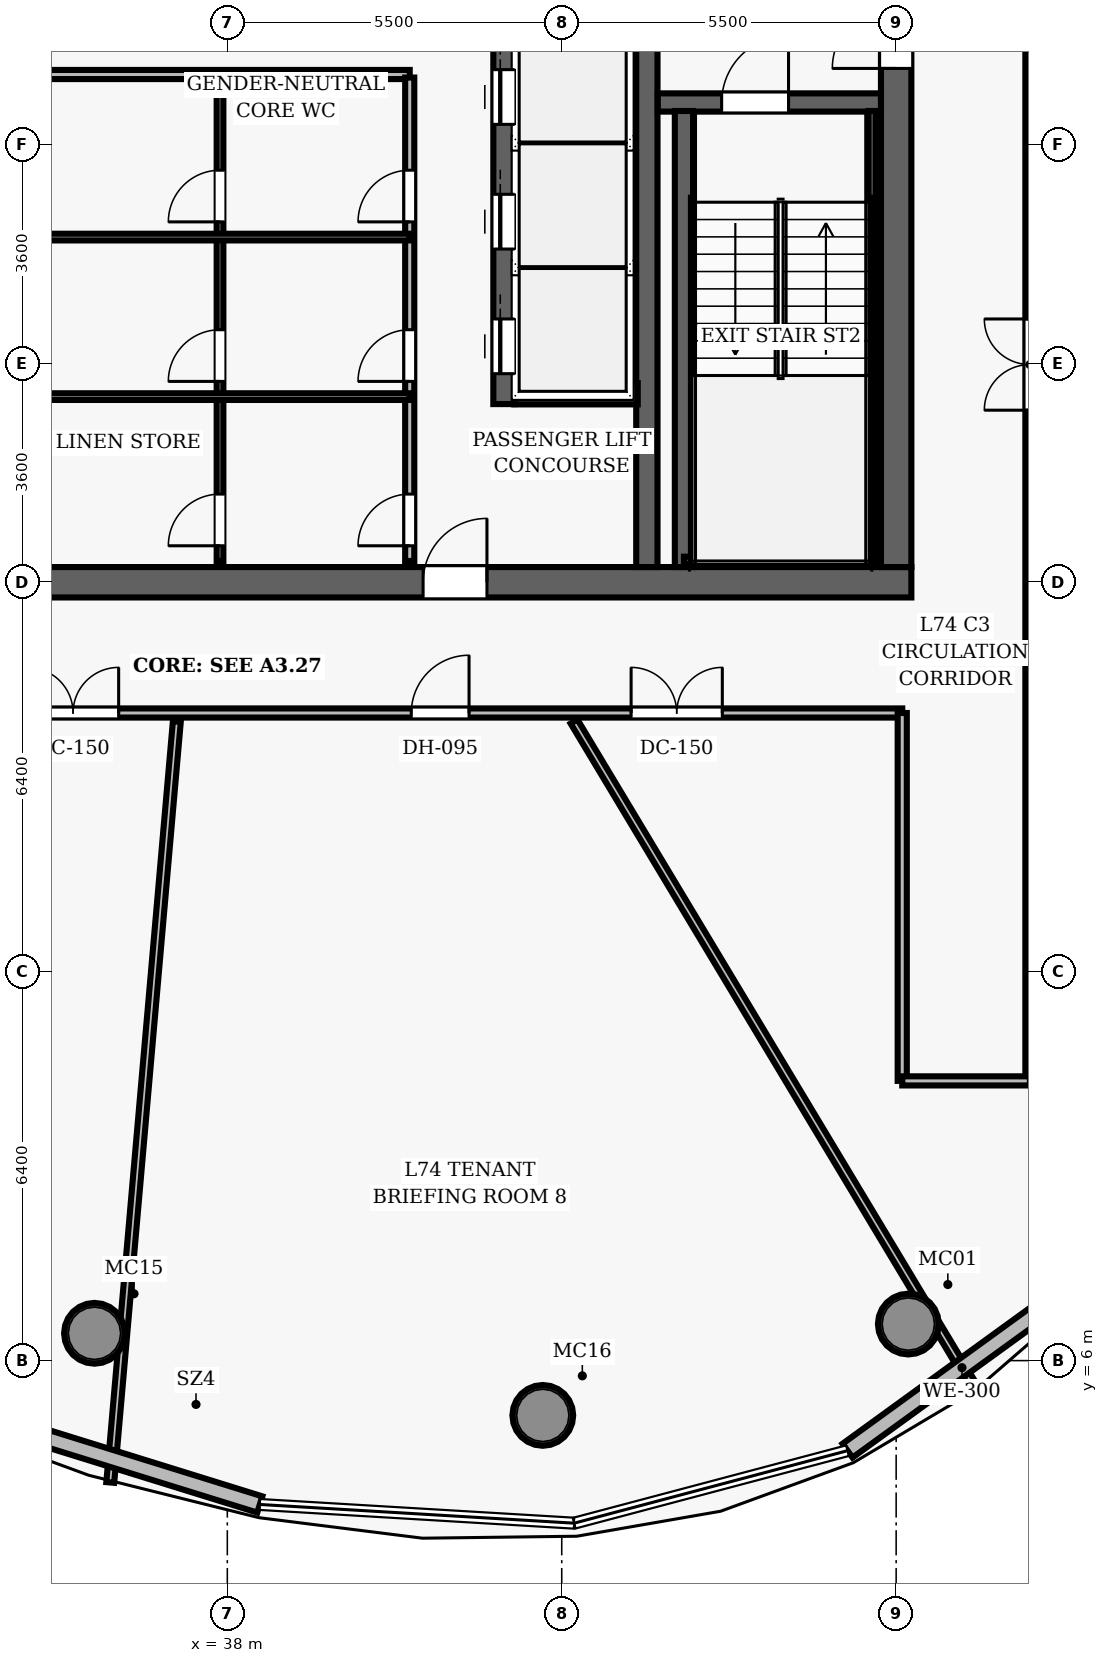
"""IFC4 building model, lengths in metres.
Left out: names, types, materials, properties, quantities, classifications, styles, units other than length and angle.
Written with IfcOpenShell. Run it as: python <this file> out.ifc"""

import sys

from ifc_helpers import new_model, si_unit, direction, frame, frame_2d, origin, origin_2d, place, context, subcontext, project, spatial, rectangle, hollow_circle, extrude, element, fill, save


model = new_model("IFC4")
c1 = context("Model", 3, precision=1e-05, world=origin(), true_north=direction((0.0, 1.0)))
c2 = subcontext(c1, "Body", "Model", "MODEL_VIEW")
j1 = project(units=[si_unit("LENGTHUNIT", "METRE"), si_unit("PLANEANGLEUNIT", "RADIAN")], contexts=[c1])
p1 = place(None, origin())
s1 = spatial("IfcSite", under=j1, at=p1, CompositionType="ELEMENT")
p2 = place(p1, origin())
s2 = spatial("IfcBuilding", under=s1, at=p2, CompositionType="ELEMENT")
p3 = place(p2, frame((0.0, 0.0, 292.1)))
s3 = spatial("IfcBuildingStorey", under=s2, at=p3, CompositionType="ELEMENT", Elevation=292.1)
p4 = place(p3, frame((26.75, 18.8, 0.0), z_axis=(0.0, 0.0, 1.0), x_axis=(1.0, 0.0, 0.0)))
e1 = element("IfcWall", 1, at=p4, inside=s3, PredefinedType="SHEAR", context=c2, shape_type="SweptSolid", body=[
    extrude(rectangle(XDim=22.5, YDim=0.5, at=frame_2d((11.25, 0.0))), origin(), (0.0, 0.0, 1.0), 3.85),
])
p5 = place(p4, frame((14.47, 0.0, 0.0)))
e2 = element("IfcOpeningElement", 2, at=p5, cuts=e1, PredefinedType="OPENING", context=c2, shape_type="SweptSolid", body=[
    extrude(rectangle(XDim=1.05, YDim=2.15, at=frame_2d((0.525, 1.075))), frame((0.0, 0.26, 0.0), z_axis=(0.0, -1.0, 0.0), x_axis=(1.0, 0.0, 0.0)), (0.0, 0.0, 1.0), 0.52),
])
p6 = place(p3, frame((49.0, 19.05, 0.0), z_axis=(0.0, 0.0, 1.0), x_axis=(0.0, 1.0, 0.0)))
e3 = element("IfcWall", 3, at=p6, inside=s3, PredefinedType="SHEAR", context=c2, shape_type="SweptSolid", body=[
    extrude(rectangle(XDim=13.9, YDim=0.5, at=frame_2d((6.95, 0.0))), origin(), (0.0, 0.0, 1.0), 3.85),
])
p7 = place(p6, frame((8.2, 0.0, 0.0)))
e4 = element("IfcOpeningElement", 4, at=p7, cuts=e3, PredefinedType="OPENING", context=c2, shape_type="SweptSolid", body=[
    extrude(rectangle(XDim=1.05, YDim=2.15, at=frame_2d((0.525, 1.075))), frame((0.0, 0.26, 0.0), z_axis=(0.0, -1.0, 0.0), x_axis=(1.0, 0.0, 0.0)), (0.0, 0.0, 1.0), 0.52),
])
p8 = place(p3, frame((44.9, 19.05, 0.0), z_axis=(0.0, 0.0, 1.0), x_axis=(0.0, 1.0, 0.0)))
e5 = element("IfcWall", 5, at=p8, inside=s3, PredefinedType="SHEAR", context=c2, shape_type="SweptSolid", body=[
    extrude(rectangle(XDim=13.9, YDim=0.35, at=frame_2d((6.95, 0.0))), origin(), (0.0, 0.0, 1.0), 3.85),
])
for number, where, z_axis, x_axis in (
    (6, (49.2, 6.601, 0.0), (0.0, 0.0, 1.0), (1.0, 0.0, 0.0)),
    (7, (35.815, 6.449, 0.0), (0.0, 0.0, 1.0), (1.0, 0.0, 0.0)),
    (8, (43.188, 5.099, 0.0), (0.0, 0.0, 1.0), (1.0, 0.0, 0.0)),
):
    element("IfcColumn", number, at=place(p3, frame(where, z_axis=z_axis, x_axis=x_axis)), inside=s3, PredefinedType="COLUMN", context=c2, shape_type="SweptSolid", body=[
        extrude(hollow_circle(Radius=0.5, WallThickness=0.045, at=origin_2d()), origin(), (0.0, 0.0, 1.0), 3.85),
    ])
p9 = place(p3, frame((45.08, 26.69, 0.0), z_axis=(0.0, 0.0, 1.0), x_axis=(1.0, 0.0, 0.0)))
e9 = element("IfcWall", 9, at=p9, inside=s3, PredefinedType="SHEAR", context=c2, shape_type="SweptSolid", body=[
    extrude(rectangle(XDim=3.67, YDim=0.3, at=frame_2d((1.835, 0.0))), origin(), (0.0, 0.0, 1.0), 3.85),
])
p10 = place(p9, frame((1.05, 0.0, 0.0)))
e10 = element("IfcOpeningElement", 10, at=p10, cuts=e9, PredefinedType="OPENING", context=c2, shape_type="SweptSolid", body=[
    extrude(rectangle(XDim=1.1, YDim=2.15, at=frame_2d((0.55, 1.075))), frame((0.0, 0.16, 0.0), z_axis=(0.0, -1.0, 0.0), x_axis=(1.0, 0.0, 0.0)), (0.0, 0.0, 1.0), 0.32),
])
p11 = place(p3, frame((45.51, 19.05, 0.0), z_axis=(0.0, 0.0, 1.0), x_axis=(0.0, 1.0, 0.0)))
e11 = element("IfcWall", 11, at=p11, inside=s3, PredefinedType="SHEAR", context=c2, shape_type="SweptSolid", body=[
    extrude(rectangle(XDim=7.5, YDim=0.3, at=frame_2d((3.75, 0.0))), origin(), (0.0, 0.0, 1.0), 3.85),
])
p12 = place(p3, frame((48.605, 19.1, 0.0), z_axis=(0.0, 0.0, 1.0), x_axis=(0.0, 1.0, 0.0)))
e12 = element("IfcWall", 12, at=p12, inside=s3, PredefinedType="SHEAR", context=c2, shape_type="SweptSolid", body=[
    extrude(rectangle(XDim=7.45, YDim=0.12, at=frame_2d((3.725, 0.0))), origin(), (0.0, 0.0, 1.0), 3.85),
])
p13 = place(p3, frame((45.51, 19.16, 0.0), z_axis=(0.0, 0.0, 1.0), x_axis=(1.0, 0.0, 0.0)))
e13 = element("IfcWall", 13, at=p13, inside=s3, PredefinedType="SHEAR", context=c2, shape_type="SweptSolid", body=[
    extrude(rectangle(XDim=3.095, YDim=0.12, at=frame_2d((1.547, 0.0))), origin(), (0.0, 0.0, 1.0), 3.85),
])
p14 = place(p3, frame((42.55, 21.73, 0.0), z_axis=(0.0, 0.0, 1.0), x_axis=(0.0, 1.0, 0.0)))
e14 = element("IfcWall", 14, at=p14, inside=s3, PredefinedType="SHEAR", context=c2, shape_type="SweptSolid", body=[
    extrude(rectangle(XDim=6.54, YDim=0.35, at=frame_2d((3.27, 0.0))), origin(), (0.0, 0.0, 1.0), 3.04),
])
p15 = place(p14, frame((0.5, 0.0, 0.0)))
e15 = element("IfcOpeningElement", 15, at=p15, cuts=e14, PredefinedType="OPENING", context=c2, shape_type="SweptSolid", body=[
    extrude(rectangle(XDim=0.9, YDim=2.15, at=frame_2d((0.45, 1.075))), frame((0.0, 0.185, 0.0), z_axis=(0.0, -1.0, 0.0), x_axis=(1.0, 0.0, 0.0)), (0.0, 0.0, 1.0), 0.37),
])
p16 = place(p14, frame((2.55, 0.0, 0.0)))
e16 = element("IfcOpeningElement", 16, at=p16, cuts=e14, PredefinedType="OPENING", context=c2, shape_type="SweptSolid", body=[
    extrude(rectangle(XDim=0.9, YDim=2.15, at=frame_2d((0.45, 1.075))), frame((0.0, 0.185, 0.0), z_axis=(0.0, -1.0, 0.0), x_axis=(1.0, 0.0, 0.0)), (0.0, 0.0, 1.0), 0.37),
])
p17 = place(p14, frame((4.6, 0.0, 0.0)))
e17 = element("IfcOpeningElement", 17, at=p17, cuts=e14, PredefinedType="OPENING", context=c2, shape_type="SweptSolid", body=[
    extrude(rectangle(XDim=0.9, YDim=2.15, at=frame_2d((0.45, 1.075))), frame((0.0, 0.185, 0.0), z_axis=(0.0, -1.0, 0.0), x_axis=(1.0, 0.0, 0.0)), (0.0, 0.0, 1.0), 0.37),
])
p18 = place(p3, frame((42.72, 21.9, 0.0), z_axis=(0.0, 0.0, 1.0), x_axis=(1.0, 0.0, 0.0)))
e18 = element("IfcWall", 18, at=p18, inside=s3, PredefinedType="SHEAR", context=c2, shape_type="SweptSolid", body=[
    extrude(rectangle(XDim=2.03, YDim=0.35, at=frame_2d((1.015, 0.0))), origin(), (0.0, 0.0, 1.0), 3.04),
])
p19 = place(p3, frame((34.64, 27.15, 0.0), z_axis=(0.0, 0.0, 1.0), x_axis=(1.0, 0.0, 0.0)))
e19 = element("IfcWall", 19, at=p19, inside=s3, PredefinedType="PARTITIONING", context=c2, shape_type="SweptSolid", body=[
    extrude(rectangle(XDim=6.36, YDim=0.15, at=frame_2d((3.18, 0.0))), origin(), (0.0, 0.0, 1.0), 3.04),
])
p20 = place(p3, frame((41.0, 19.15, 0.0), z_axis=(0.0, 0.0, 1.0), x_axis=(0.0, 1.0, 0.0)))
e20 = element("IfcWall", 20, at=p20, inside=s3, PredefinedType="PARTITIONING", context=c2, shape_type="SweptSolid", body=[
    extrude(rectangle(XDim=7.95, YDim=0.15, at=frame_2d((3.975, 0.0))), origin(), (0.0, 0.0, 1.0), 3.04),
])
p21 = place(p20, frame((0.25, 0.0, 0.0)))
e21 = element("IfcOpeningElement", 21, at=p21, cuts=e20, PredefinedType="OPENING", context=c2, shape_type="SweptSolid", body=[
    extrude(rectangle(XDim=0.85, YDim=2.1, at=frame_2d((0.425, 1.05))), frame((0.0, 0.085, 0.0), z_axis=(0.0, -1.0, 0.0), x_axis=(1.0, 0.0, 0.0)), (0.0, 0.0, 1.0), 0.17),
])
p22 = place(p20, frame((2.953, 0.0, 0.0)))
e22 = element("IfcOpeningElement", 22, at=p22, cuts=e20, PredefinedType="OPENING", context=c2, shape_type="SweptSolid", body=[
    extrude(rectangle(XDim=0.85, YDim=2.1, at=frame_2d((0.425, 1.05))), frame((0.0, 0.085, 0.0), z_axis=(0.0, -1.0, 0.0), x_axis=(1.0, 0.0, 0.0)), (0.0, 0.0, 1.0), 0.17),
])
p23 = place(p20, frame((5.576, 0.0, 0.0)))
e23 = element("IfcOpeningElement", 23, at=p23, cuts=e20, PredefinedType="OPENING", context=c2, shape_type="SweptSolid", body=[
    extrude(rectangle(XDim=0.85, YDim=2.1, at=frame_2d((0.425, 1.05))), frame((0.0, 0.085, 0.0), z_axis=(0.0, -1.0, 0.0), x_axis=(1.0, 0.0, 0.0)), (0.0, 0.0, 1.0), 0.17),
])
p24 = place(p3, frame((37.88, 19.15, 0.0), z_axis=(0.0, 0.0, 1.0), x_axis=(0.0, 1.0, 0.0)))
e24 = element("IfcWall", 24, at=p24, inside=s3, PredefinedType="PARTITIONING", context=c2, shape_type="SweptSolid", body=[
    extrude(rectangle(XDim=7.95, YDim=0.11, at=frame_2d((3.975, 0.0))), origin(), (0.0, 0.0, 1.0), 3.04),
])
p25 = place(p24, frame((0.25, 0.0, 0.0)))
e25 = element("IfcOpeningElement", 25, at=p25, cuts=e24, PredefinedType="OPENING", context=c2, shape_type="SweptSolid", body=[
    extrude(rectangle(XDim=0.85, YDim=2.1, at=frame_2d((0.425, 1.05))), frame((0.0, 0.065, 0.0), z_axis=(0.0, -1.0, 0.0), x_axis=(1.0, 0.0, 0.0)), (0.0, 0.0, 1.0), 0.13),
])
p26 = place(p24, frame((2.953, 0.0, 0.0)))
e26 = element("IfcOpeningElement", 26, at=p26, cuts=e24, PredefinedType="OPENING", context=c2, shape_type="SweptSolid", body=[
    extrude(rectangle(XDim=0.85, YDim=2.1, at=frame_2d((0.425, 1.05))), frame((0.0, 0.065, 0.0), z_axis=(0.0, -1.0, 0.0), x_axis=(1.0, 0.0, 0.0)), (0.0, 0.0, 1.0), 0.13),
])
p27 = place(p24, frame((5.576, 0.0, 0.0)))
e27 = element("IfcOpeningElement", 27, at=p27, cuts=e24, PredefinedType="OPENING", context=c2, shape_type="SweptSolid", body=[
    extrude(rectangle(XDim=0.85, YDim=2.1, at=frame_2d((0.425, 1.05))), frame((0.0, 0.065, 0.0), z_axis=(0.0, -1.0, 0.0), x_axis=(1.0, 0.0, 0.0)), (0.0, 0.0, 1.0), 0.13),
])
for number, where, z_axis, x_axis in (
    (28, (34.75, 21.853, 0.0), (0.0, 0.0, 1.0), (1.0, 0.0, 0.0)),
    (29, (34.75, 24.477, 0.0), (0.0, 0.0, 1.0), (1.0, 0.0, 0.0)),
):
    element("IfcWall", number, at=place(p3, frame(where, z_axis=z_axis, x_axis=x_axis)), inside=s3, PredefinedType="PARTITIONING", context=c2, shape_type="SweptSolid", body=[
        extrude(rectangle(XDim=6.25, YDim=0.11, at=frame_2d((3.125, 0.0))), origin(), (0.0, 0.0, 1.0), 3.04),
    ])
p28 = place(p3, frame((26.9, 16.65, 0.0), z_axis=(0.0, 0.0, 1.0), x_axis=(1.0, 0.0, 0.0)))
e30 = element("IfcWall", 30, at=p28, inside=s3, PredefinedType="PARTITIONING", context=c2, shape_type="SweptSolid", body=[
    extrude(rectangle(XDim=22.2, YDim=0.15, at=frame_2d((11.1, 0.0))), origin(), (0.0, 0.0, 1.0), 3.04),
])
p29 = place(p28, frame((7.813, 0.0, 0.0)))
e31 = element("IfcOpeningElement", 31, at=p29, cuts=e30, PredefinedType="OPENING", context=c2, shape_type="SweptSolid", body=[
    extrude(rectangle(XDim=1.5, YDim=2.2, at=frame_2d((0.75, 1.1))), frame((0.0, 0.085, 0.0), z_axis=(0.0, -1.0, 0.0), x_axis=(1.0, 0.0, 0.0)), (0.0, 0.0, 1.0), 0.17),
])
p30 = place(p28, frame((14.125, 0.0, 0.0)))
e32 = element("IfcOpeningElement", 32, at=p30, cuts=e30, PredefinedType="OPENING", context=c2, shape_type="SweptSolid", body=[
    extrude(rectangle(XDim=0.95, YDim=2.15, at=frame_2d((0.475, 1.075))), frame((0.0, 0.085, 0.0), z_axis=(0.0, -1.0, 0.0), x_axis=(1.0, 0.0, 0.0)), (0.0, 0.0, 1.0), 0.17),
])
p31 = place(p28, frame((17.741, 0.0, 0.0)))
e33 = element("IfcOpeningElement", 33, at=p31, cuts=e30, PredefinedType="OPENING", context=c2, shape_type="SweptSolid", body=[
    extrude(rectangle(XDim=1.5, YDim=2.2, at=frame_2d((0.75, 1.1))), frame((0.0, 0.085, 0.0), z_axis=(0.0, -1.0, 0.0), x_axis=(1.0, 0.0, 0.0)), (0.0, 0.0, 1.0), 0.17),
])
p32 = place(p3, frame((51.2, 10.6, 0.0), z_axis=(0.0, 0.0, 1.0), x_axis=(0.0, 1.0, 0.0)))
e34 = element("IfcWall", 34, at=p32, inside=s3, PredefinedType="PARTITIONING", context=c2, shape_type="SweptSolid", body=[
    extrude(rectangle(XDim=30.8, YDim=0.15, at=frame_2d((15.4, 0.0))), origin(), (0.0, 0.0, 1.0), 3.04),
])
p33 = place(p32, frame((26.895, 0.0, 0.0)))
e35 = element("IfcOpeningElement", 35, at=p33, cuts=e34, PredefinedType="OPENING", context=c2, shape_type="SweptSolid", body=[
    extrude(rectangle(XDim=1.5, YDim=2.2, at=frame_2d((0.75, 1.1))), frame((0.0, 0.085, 0.0), z_axis=(0.0, -1.0, 0.0), x_axis=(1.0, 0.0, 0.0)), (0.0, 0.0, 1.0), 0.17),
])
p34 = place(p32, frame((11.03, 0.0, 0.0)))
e36 = element("IfcOpeningElement", 36, at=p34, cuts=e34, PredefinedType="OPENING", context=c2, shape_type="SweptSolid", body=[
    extrude(rectangle(XDim=1.5, YDim=2.2, at=frame_2d((0.75, 1.1))), frame((0.0, 0.085, 0.0), z_axis=(0.0, -1.0, 0.0), x_axis=(1.0, 0.0, 0.0)), (0.0, 0.0, 1.0), 0.17),
])
p35 = place(p3, frame((49.1, 10.6, 0.0), z_axis=(0.0, 0.0, 1.0), x_axis=(0.0, 1.0, 0.0)))
e37 = element("IfcWall", 37, at=p35, inside=s3, PredefinedType="PARTITIONING", context=c2, shape_type="SweptSolid", body=[
    extrude(rectangle(XDim=6.05, YDim=0.15, at=frame_2d((3.025, 0.0))), origin(), (0.0, 0.0, 1.0), 3.04),
])
p36 = place(p3, frame((49.1, 10.6, 0.0), z_axis=(0.0, 0.0, 1.0), x_axis=(1.0, 0.0, 0.0)))
e38 = element("IfcWall", 38, at=p36, inside=s3, PredefinedType="PARTITIONING", context=c2, shape_type="SweptSolid", body=[
    extrude(rectangle(XDim=2.1, YDim=0.15, at=frame_2d((1.05, 0.0))), origin(), (0.0, 0.0, 1.0), 3.04),
])
p37 = place(p3, frame((37.17, 16.51, 0.0), z_axis=(0.0, 0.0, 1.0), x_axis=(-0.087144529253, -0.996195679082, 0.0)))
e39 = element("IfcWall", 39, at=p37, inside=s3, PredefinedType="PARTITIONING", context=c2, shape_type="SweptSolid", body=[
    extrude(rectangle(XDim=12.562, YDim=0.13, at=frame_2d((6.281, 0.0))), origin(), (0.0, 0.0, 1.0), 3.04),
])
p38 = place(p3, frame((43.702, 16.51, 0.0), z_axis=(0.0, 0.0, 1.0), x_axis=(0.515037616381, -0.857167576214, 0.0)))
e40 = element("IfcWall", 40, at=p38, inside=s3, PredefinedType="PARTITIONING", context=c2, shape_type="SweptSolid", body=[
    extrude(rectangle(XDim=12.852, YDim=0.13, at=frame_2d((6.426, 0.0))), origin(), (0.0, 0.0, 1.0), 3.04),
])
p39 = place(p3, frame((51.965, 7.249, 0.0), z_axis=(0.0, 0.0, 1.0), x_axis=(-0.809566158973, -0.587028648573, 0.0)))
e41 = element("IfcWall", 41, at=p39, inside=s3, PredefinedType="SOLIDWALL", context=c2, shape_type="SweptSolid", body=[
    extrude(rectangle(XDim=4.65, YDim=0.28, at=frame_2d((2.325, 0.0))), origin(), (0.0, 0.0, 1.0), 3.625),
])
p40 = place(p3, frame((38.535, 3.634, 0.0), z_axis=(0.0, 0.0, 1.0), x_axis=(-0.955056409613, 0.296424112476, 0.0)))
e42 = element("IfcWall", 42, at=p40, inside=s3, PredefinedType="SOLIDWALL", context=c2, shape_type="SweptSolid", body=[
    extrude(rectangle(XDim=5.86, YDim=0.28, at=frame_2d((2.93, 0.0))), origin(), (0.0, 0.0, 1.0), 3.625),
])
p41 = place(p10, origin())
e43 = element("IfcDoor", 43, at=p41, inside=s3, OperationType="SINGLE_SWING_RIGHT", PredefinedType="DOOR", context=c2, shape_type="SweptSolid", body=[
    extrude(rectangle(XDim=1.1, YDim=2.15, at=frame_2d((0.55, 1.075))), frame((0.0, 0.025, 0.0), z_axis=(0.0, -1.0, 0.0), x_axis=(1.0, 0.0, 0.0)), (0.0, 0.0, 1.0), 0.05),
])
fill(e10, e43)
p42 = place(p7, origin())
e44 = element("IfcDoor", 44, at=p42, inside=s3, OperationType="SINGLE_SWING_LEFT", PredefinedType="DOOR", context=c2, shape_type="SweptSolid", body=[
    extrude(rectangle(XDim=1.05, YDim=2.15, at=frame_2d((0.525, 1.075))), frame((0.0, 0.025, 0.0), z_axis=(0.0, -1.0, 0.0), x_axis=(1.0, 0.0, 0.0)), (0.0, 0.0, 1.0), 0.05),
])
fill(e4, e44)
p43 = place(p5, origin())
e45 = element("IfcDoor", 45, at=p43, inside=s3, OperationType="SINGLE_SWING_RIGHT", PredefinedType="DOOR", context=c2, shape_type="SweptSolid", body=[
    extrude(rectangle(XDim=1.05, YDim=2.15, at=frame_2d((0.525, 1.075))), frame((0.0, 0.025, 0.0), z_axis=(0.0, -1.0, 0.0), x_axis=(1.0, 0.0, 0.0)), (0.0, 0.0, 1.0), 0.05),
])
fill(e2, e45)
p44 = place(p21, origin())
e46 = element("IfcDoor", 46, at=p44, inside=s3, OperationType="SINGLE_SWING_LEFT", PredefinedType="DOOR", context=c2, shape_type="SweptSolid", body=[
    extrude(rectangle(XDim=0.85, YDim=2.1, at=frame_2d((0.425, 1.05))), frame((0.0, 0.025, 0.0), z_axis=(0.0, -1.0, 0.0), x_axis=(1.0, 0.0, 0.0)), (0.0, 0.0, 1.0), 0.05),
])
fill(e21, e46)
p45 = place(p25, origin())
e47 = element("IfcDoor", 47, at=p45, inside=s3, OperationType="SINGLE_SWING_LEFT", PredefinedType="DOOR", context=c2, shape_type="SweptSolid", body=[
    extrude(rectangle(XDim=0.85, YDim=2.1, at=frame_2d((0.425, 1.05))), frame((0.0, 0.025, 0.0), z_axis=(0.0, -1.0, 0.0), x_axis=(1.0, 0.0, 0.0)), (0.0, 0.0, 1.0), 0.05),
])
fill(e25, e47)
p46 = place(p22, origin())
e48 = element("IfcDoor", 48, at=p46, inside=s3, OperationType="SINGLE_SWING_LEFT", PredefinedType="DOOR", context=c2, shape_type="SweptSolid", body=[
    extrude(rectangle(XDim=0.85, YDim=2.1, at=frame_2d((0.425, 1.05))), frame((0.0, 0.025, 0.0), z_axis=(0.0, -1.0, 0.0), x_axis=(1.0, 0.0, 0.0)), (0.0, 0.0, 1.0), 0.05),
])
fill(e22, e48)
p47 = place(p26, origin())
e49 = element("IfcDoor", 49, at=p47, inside=s3, OperationType="SINGLE_SWING_LEFT", PredefinedType="DOOR", context=c2, shape_type="SweptSolid", body=[
    extrude(rectangle(XDim=0.85, YDim=2.1, at=frame_2d((0.425, 1.05))), frame((0.0, 0.025, 0.0), z_axis=(0.0, -1.0, 0.0), x_axis=(1.0, 0.0, 0.0)), (0.0, 0.0, 1.0), 0.05),
])
fill(e26, e49)
p48 = place(p23, origin())
e50 = element("IfcDoor", 50, at=p48, inside=s3, OperationType="SINGLE_SWING_LEFT", PredefinedType="DOOR", context=c2, shape_type="SweptSolid", body=[
    extrude(rectangle(XDim=0.85, YDim=2.1, at=frame_2d((0.425, 1.05))), frame((0.0, 0.025, 0.0), z_axis=(0.0, -1.0, 0.0), x_axis=(1.0, 0.0, 0.0)), (0.0, 0.0, 1.0), 0.05),
])
fill(e23, e50)
p49 = place(p27, origin())
e51 = element("IfcDoor", 51, at=p49, inside=s3, OperationType="SINGLE_SWING_LEFT", PredefinedType="DOOR", context=c2, shape_type="SweptSolid", body=[
    extrude(rectangle(XDim=0.85, YDim=2.1, at=frame_2d((0.425, 1.05))), frame((0.0, 0.025, 0.0), z_axis=(0.0, -1.0, 0.0), x_axis=(1.0, 0.0, 0.0)), (0.0, 0.0, 1.0), 0.05),
])
fill(e27, e51)
p50 = place(p29, origin())
e52 = element("IfcDoor", 52, at=p50, inside=s3, OperationType="DOUBLE_DOOR_SINGLE_SWING", PredefinedType="DOOR", context=c2, shape_type="SweptSolid", body=[
    extrude(rectangle(XDim=1.5, YDim=2.2, at=frame_2d((0.75, 1.1))), frame((0.0, 0.025, 0.0), z_axis=(0.0, -1.0, 0.0), x_axis=(1.0, 0.0, 0.0)), (0.0, 0.0, 1.0), 0.05),
])
fill(e31, e52)
p51 = place(p30, origin())
e53 = element("IfcDoor", 53, at=p51, inside=s3, OperationType="SINGLE_SWING_RIGHT", PredefinedType="DOOR", context=c2, shape_type="SweptSolid", body=[
    extrude(rectangle(XDim=0.95, YDim=2.15, at=frame_2d((0.475, 1.075))), frame((0.0, 0.025, 0.0), z_axis=(0.0, -1.0, 0.0), x_axis=(1.0, 0.0, 0.0)), (0.0, 0.0, 1.0), 0.05),
])
fill(e32, e53)
p52 = place(p31, origin())
e54 = element("IfcDoor", 54, at=p52, inside=s3, OperationType="DOUBLE_DOOR_SINGLE_SWING", PredefinedType="DOOR", context=c2, shape_type="SweptSolid", body=[
    extrude(rectangle(XDim=1.5, YDim=2.2, at=frame_2d((0.75, 1.1))), frame((0.0, 0.025, 0.0), z_axis=(0.0, -1.0, 0.0), x_axis=(1.0, 0.0, 0.0)), (0.0, 0.0, 1.0), 0.05),
])
fill(e33, e54)
p53 = place(p15, origin())
e55 = element("IfcDoor", 55, at=p53, inside=s3, OperationType="SLIDING_TO_LEFT", PredefinedType="DOOR", context=c2, shape_type="SweptSolid", body=[
    extrude(rectangle(XDim=0.9, YDim=2.15, at=frame_2d((0.45, 1.075))), frame((0.0, 0.025, 0.0), z_axis=(0.0, -1.0, 0.0), x_axis=(1.0, 0.0, 0.0)), (0.0, 0.0, 1.0), 0.05),
])
fill(e15, e55)
p54 = place(p16, origin())
e56 = element("IfcDoor", 56, at=p54, inside=s3, OperationType="SLIDING_TO_LEFT", PredefinedType="DOOR", context=c2, shape_type="SweptSolid", body=[
    extrude(rectangle(XDim=0.9, YDim=2.15, at=frame_2d((0.45, 1.075))), frame((0.0, 0.025, 0.0), z_axis=(0.0, -1.0, 0.0), x_axis=(1.0, 0.0, 0.0)), (0.0, 0.0, 1.0), 0.05),
])
fill(e16, e56)
p55 = place(p17, origin())
e57 = element("IfcDoor", 57, at=p55, inside=s3, OperationType="SLIDING_TO_LEFT", PredefinedType="DOOR", context=c2, shape_type="SweptSolid", body=[
    extrude(rectangle(XDim=0.9, YDim=2.15, at=frame_2d((0.45, 1.075))), frame((0.0, 0.025, 0.0), z_axis=(0.0, -1.0, 0.0), x_axis=(1.0, 0.0, 0.0)), (0.0, 0.0, 1.0), 0.05),
])
fill(e17, e57)
save(model, sys.argv[1])
